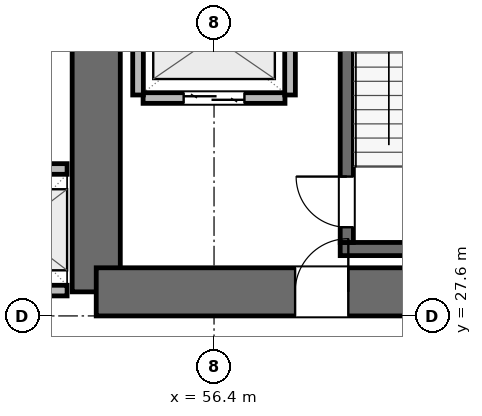
"""IFC4 building model, lengths in metres.
Left out: names, types, materials, properties, quantities, classifications, styles, units other than length and angle.
Written with IfcOpenShell. Run it as: python <this file> out.ifc"""

import sys

from ifc_helpers import new_model, si_unit, direction, frame, frame_2d, origin, place, context, subcontext, project, spatial, rectangle, extrude, element, fill, save


model = new_model("IFC4")
c1 = context("Model", 3, precision=1e-05, world=origin(), true_north=direction((0.0, 1.0)))
c2 = subcontext(c1, "Body", "Model", "MODEL_VIEW")
j1 = project(units=[si_unit("LENGTHUNIT", "METRE"), si_unit("PLANEANGLEUNIT", "RADIAN")], contexts=[c1])
p1 = place(None, origin())
s1 = spatial("IfcSite", under=j1, at=p1, CompositionType="ELEMENT")
p2 = place(p1, origin())
s2 = spatial("IfcBuilding", under=s1, at=p2, CompositionType="ELEMENT")
p3 = place(p2, frame((0.0, 0.0, 85.8)))
s3 = spatial("IfcBuildingStorey", under=s2, at=p3, CompositionType="ELEMENT", Elevation=85.8)
p4 = place(p3, frame((54.075, 28.075, 0.0), z_axis=(0.0, 0.0, 1.0), x_axis=(0.0, 1.0, 0.0)))
e1 = element("IfcWall", 1, at=p4, inside=s3, PredefinedType="SHEAR", context=c2, shape_type="SweptSolid", body=[
    extrude(rectangle(XDim=7.725, YDim=0.95, at=frame_2d((3.863, 0.0))), origin(), (0.0, 0.0, 1.0), 3.9),
])
p5 = place(p3, frame((54.075, 28.075, 0.0), z_axis=(0.0, 0.0, 1.0), x_axis=(1.0, 0.0, 0.0)))
e2 = element("IfcWall", 2, at=p5, inside=s3, PredefinedType="SHEAR", context=c2, shape_type="SweptSolid", body=[
    extrude(rectangle(XDim=9.05, YDim=0.95, at=frame_2d((4.525, 0.0))), origin(), (0.0, 0.0, 1.0), 3.9),
])
p6 = place(p5, frame((3.925, 0.0, 0.0)))
e3 = element("IfcOpeningElement", 3, at=p6, cuts=e2, PredefinedType="OPENING", context=c2, shape_type="SweptSolid", body=[
    extrude(rectangle(XDim=1.05, YDim=2.04, at=frame_2d((0.525, 1.02))), frame((0.0, 0.485, 0.0), z_axis=(0.0, -1.0, 0.0), x_axis=(1.0, 0.0, 0.0)), (0.0, 0.0, 1.0), 0.97),
])
p7 = place(p3, frame((58.89, 28.92, 0.0), z_axis=(0.0, 0.0, 1.0), x_axis=(1.0, 0.0, 0.0)))
e4 = element("IfcWall", 4, at=p7, inside=s3, PredefinedType="SHEAR", context=c2, shape_type="SweptSolid", body=[
    extrude(rectangle(XDim=3.76, YDim=0.26, at=frame_2d((1.88, 0.0))), origin(), (0.0, 0.0, 1.0), 3.9),
])
p8 = place(p3, frame((59.02, 29.05, 0.0), z_axis=(0.0, 0.0, 1.0), x_axis=(0.0, 1.0, 0.0)))
e5 = element("IfcWall", 5, at=p8, inside=s3, PredefinedType="SHEAR", context=c2, shape_type="SweptSolid", body=[
    extrude(rectangle(XDim=7.6, YDim=0.26, at=frame_2d((3.8, 0.0))), origin(), (0.0, 0.0, 1.0), 3.9),
])
p9 = place(p8, frame((0.3, 0.0, 0.0)))
e6 = element("IfcOpeningElement", 6, at=p9, cuts=e5, PredefinedType="OPENING", context=c2, shape_type="SweptSolid", body=[
    extrude(rectangle(XDim=1.0, YDim=2.04, at=frame_2d((0.5, 1.02))), frame((0.0, 0.14, 0.0), z_axis=(0.0, -1.0, 0.0), x_axis=(1.0, 0.0, 0.0)), (0.0, 0.0, 1.0), 0.28),
])
p10 = place(p3, frame((55.0, 31.9, 0.0), z_axis=(0.0, 0.0, 1.0), x_axis=(1.0, 0.0, 0.0)))
e7 = element("IfcWall", 7, at=p10, inside=s3, PredefinedType="PARTITIONING", context=c2, shape_type="SweptSolid", body=[
    extrude(rectangle(XDim=2.8, YDim=0.21, at=frame_2d((1.4, 0.0))), origin(), (0.0, 0.0, 1.0), 3.64),
])
p11 = place(p10, frame((0.8, 0.0, 0.0)))
e8 = element("IfcOpeningElement", 8, at=p11, cuts=e7, PredefinedType="OPENING", context=c2, shape_type="SweptSolid", body=[
    extrude(rectangle(XDim=1.2, YDim=2.04, at=frame_2d((0.6, 1.02))), frame((0.0, 0.115, 0.0), z_axis=(0.0, -1.0, 0.0), x_axis=(1.0, 0.0, 0.0)), (0.0, 0.0, 1.0), 0.23),
])
for number, where, z_axis, x_axis in (
    (9, (54.9, 31.96, 0.0), (0.0, 0.0, 1.0), (0.0, 1.0, 0.0)),
    (10, (57.9, 31.96, 0.0), (0.0, 0.0, 1.0), (0.0, 1.0, 0.0)),
):
    element("IfcWall", number, at=place(p3, frame(where, z_axis=z_axis, x_axis=x_axis)), inside=s3, PredefinedType="PARTITIONING", context=c2, shape_type="SweptSolid", body=[
        extrude(rectangle(XDim=2.28, YDim=0.21, at=frame_2d((1.14, 0.0))), origin(), (0.0, 0.0, 1.0), 3.64),
    ])
p12 = place(p3, frame((51.4, 30.5, 0.0), z_axis=(0.0, 0.0, 1.0), x_axis=(1.0, 0.0, 0.0)))
e11 = element("IfcWall", 11, at=p12, inside=s3, PredefinedType="PARTITIONING", context=c2, shape_type="SweptSolid", body=[
    extrude(rectangle(XDim=2.1, YDim=0.21, at=frame_2d((1.05, 0.0))), origin(), (0.0, 0.0, 1.0), 3.64),
])
p13 = place(p12, frame((0.5, 0.0, 0.0)))
e12 = element("IfcOpeningElement", 12, at=p13, cuts=e11, PredefinedType="OPENING", context=c2, shape_type="SweptSolid", body=[
    extrude(rectangle(XDim=1.1, YDim=2.04, at=frame_2d((0.55, 1.02))), frame((0.0, 0.115, 0.0), z_axis=(0.0, -1.0, 0.0), x_axis=(1.0, 0.0, 0.0)), (0.0, 0.0, 1.0), 0.23),
])
p14 = place(p3, frame((51.4, 28.1, 0.0), z_axis=(0.0, 0.0, 1.0), x_axis=(1.0, 0.0, 0.0)))
e13 = element("IfcWall", 13, at=p14, inside=s3, PredefinedType="PARTITIONING", context=c2, shape_type="SweptSolid", body=[
    extrude(rectangle(XDim=2.1, YDim=0.21, at=frame_2d((1.05, 0.0))), origin(), (0.0, 0.0, 1.0), 2.525),
])
p15 = place(p9, origin())
e14 = element("IfcDoor", 14, at=p15, inside=s3, OperationType="SINGLE_SWING_RIGHT", PredefinedType="DOOR", context=c2, shape_type="SweptSolid", body=[
    extrude(rectangle(XDim=1.0, YDim=2.04, at=frame_2d((0.5, 1.02))), frame((0.0, 0.025, 0.0), z_axis=(0.0, -1.0, 0.0), x_axis=(1.0, 0.0, 0.0)), (0.0, 0.0, 1.0), 0.05),
])
fill(e6, e14)
p16 = place(p11, origin())
e15 = element("IfcDoor", 15, at=p16, inside=s3, OperationType="DOUBLE_DOOR_SLIDING", PredefinedType="DOOR", context=c2, shape_type="SweptSolid", body=[
    extrude(rectangle(XDim=1.2, YDim=2.04, at=frame_2d((0.6, 1.02))), frame((0.0, 0.025, 0.0), z_axis=(0.0, -1.0, 0.0), x_axis=(1.0, 0.0, 0.0)), (0.0, 0.0, 1.0), 0.05),
])
fill(e8, e15)
p17 = place(p6, origin())
e16 = element("IfcDoor", 16, at=p17, inside=s3, OperationType="SINGLE_SWING_RIGHT", PredefinedType="DOOR", context=c2, shape_type="SweptSolid", body=[
    extrude(rectangle(XDim=1.05, YDim=2.04, at=frame_2d((0.525, 1.02))), frame((0.0, 0.025, 0.0), z_axis=(0.0, -1.0, 0.0), x_axis=(1.0, 0.0, 0.0)), (0.0, 0.0, 1.0), 0.05),
])
fill(e3, e16)
save(model, sys.argv[1])
